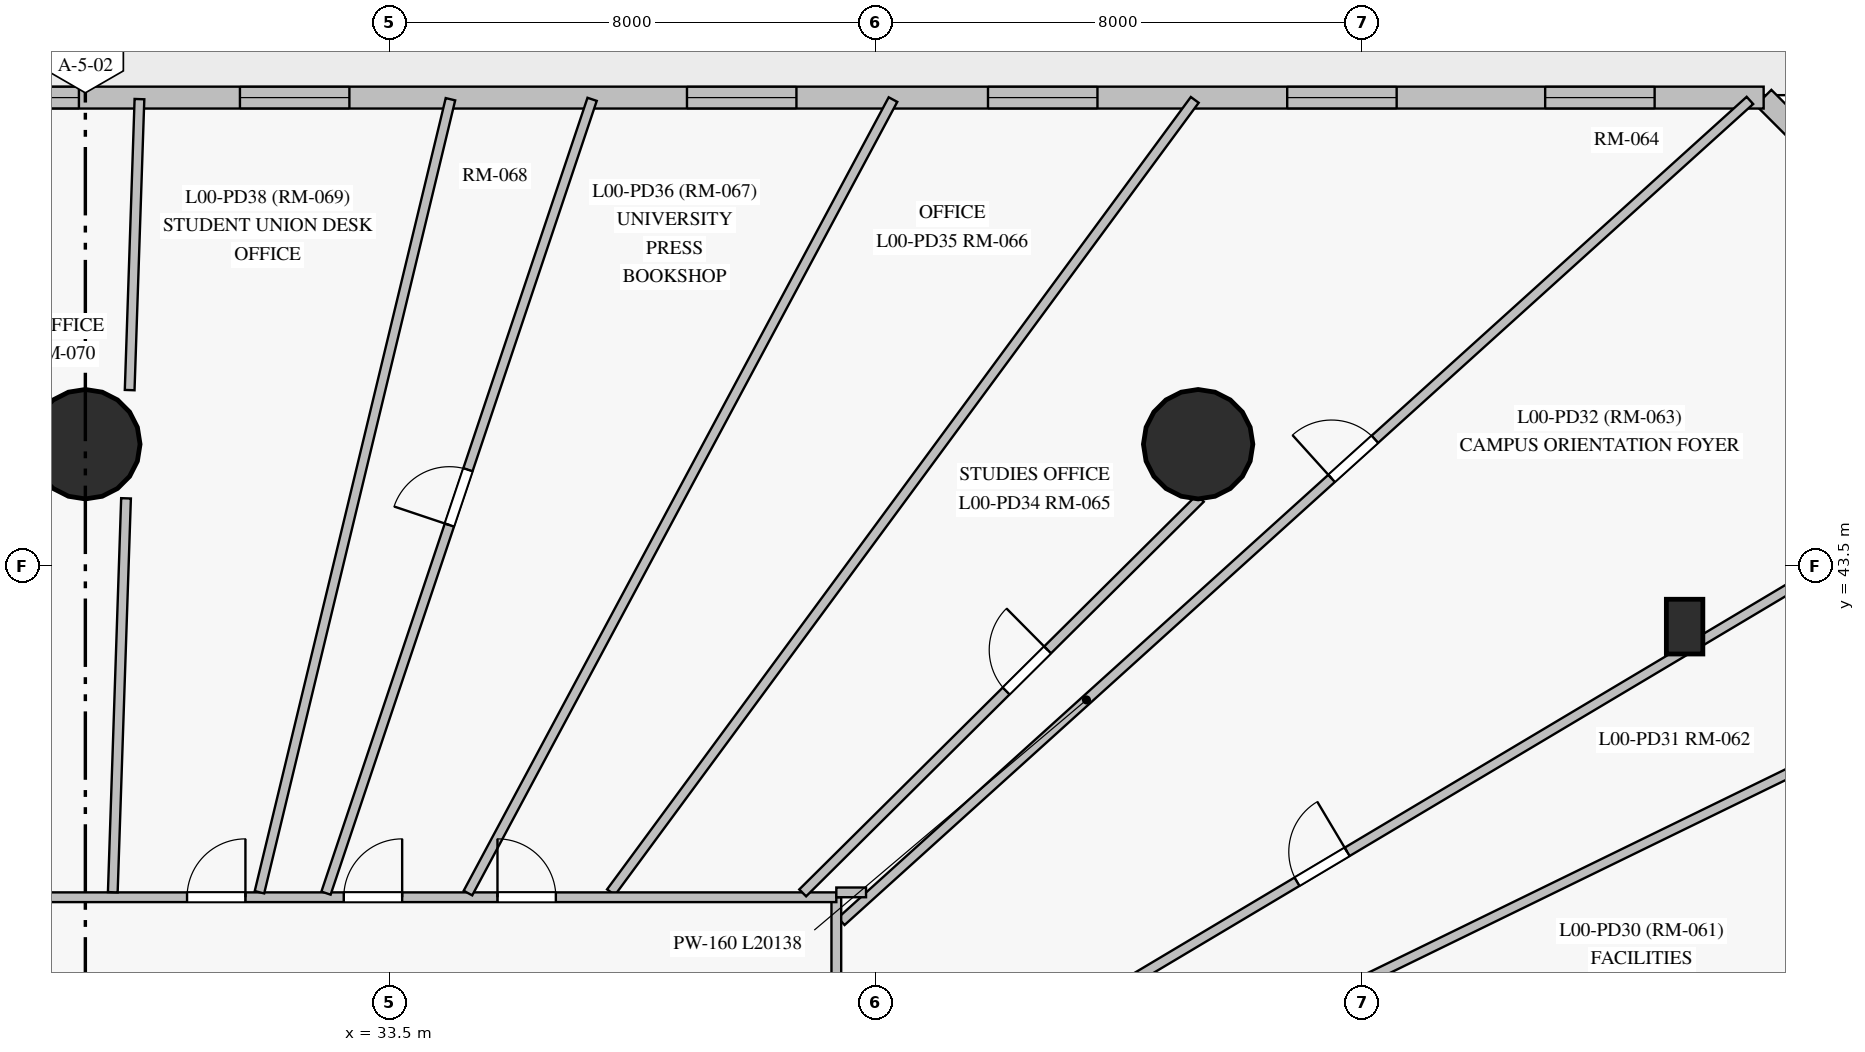
"""IFC4 building model, lengths in metres.
Left out: names, types, materials, properties, quantities, classifications, styles, units other than length and angle.
Written with IfcOpenShell. Run it as: python <this file> out.ifc"""

import sys

from ifc_helpers import new_model, si_unit, direction, frame, frame_2d, origin, origin_with_axes, origin_2d, place, context, subcontext, project, spatial, rectangle, circle, extrude, source, transform, mapped, element, fill, save


model = new_model("IFC4")
c1 = context("Model", 3, precision=1e-05, world=origin(), true_north=direction((0.0, 1.0)))
c2 = subcontext(c1, "Body", "Model", "MODEL_VIEW")
j1 = project(units=[si_unit("LENGTHUNIT", "METRE"), si_unit("PLANEANGLEUNIT", "RADIAN")], contexts=[c1])
p1 = place(None, origin())
s1 = spatial("IfcSite", under=j1, at=p1, CompositionType="ELEMENT")
p2 = place(p1, origin())
s2 = spatial("IfcBuilding", under=s1, at=p2, CompositionType="ELEMENT")
p3 = place(p2, origin())
s3 = spatial("IfcBuildingStorey", under=s2, at=p3, CompositionType="ELEMENT", Elevation=0.0)
m1 = source(origin_with_axes(), c2, "Body", "SweptSolid", [
    extrude(circle(Radius=0.9, at=origin_2d()), origin(), (0.0, 0.0, 1.0), 4.5),
])
for number, where, z_axis, x_axis in (
    (1, (28.5, 45.5, 0.0), (0.0, 0.0, 1.0), (1.0, 0.0, 0.0)),
    (2, (46.8, 45.5, 0.0), (0.0, 0.0, 1.0), (1.0, 0.0, 0.0)),
):
    element("IfcColumn", number, at=place(p3, frame(where, z_axis=z_axis, x_axis=x_axis)), inside=s3, PredefinedType="COLUMN", context=c2, shape_type="MappedRepresentation", body=[
        mapped(m1, transform((0.0, 0.0, 0.0), scale=1.0)),
    ])
m2 = source(origin_with_axes(), c2, "Body", "SweptSolid", [
    extrude(rectangle(XDim=0.6, YDim=0.9, at=origin_2d()), origin(), (0.0, 0.0, 1.0), 4.5),
])
p4 = place(p3, frame((54.8, 42.5, 0.0), z_axis=(0.0, 0.0, 1.0), x_axis=(1.0, 0.0, 0.0)))
e3 = element("IfcColumn", 3, at=p4, inside=s3, PredefinedType="PILASTER", context=c2, shape_type="MappedRepresentation", body=[
    mapped(m2, transform((0.0, 0.0, 0.0), scale=1.0)),
])
p5 = place(p3, frame((56.8, 50.5, 0.0), z_axis=(0.0, 0.0, 1.0), x_axis=(-0.707106781187, 0.707106781187, 0.0)))
e4 = element("IfcWall", 4, at=p5, inside=s3, PredefinedType="SOLIDWALL", context=c2, shape_type="SweptSolid", body=[
    extrude(rectangle(XDim=0.99, YDim=0.36, at=frame_2d((0.495, 0.0))), origin(), (0.0, 0.0, 1.0), 4.2),
])
p6 = place(p3, frame((1.5, 51.2, 0.0), z_axis=(0.0, 0.0, 1.0), x_axis=(1.0, 0.0, 0.0)))
e5 = element("IfcWall", 5, at=p6, inside=s3, PredefinedType="SOLIDWALL", context=c2, shape_type="SweptSolid", body=[
    extrude(rectangle(XDim=54.6, YDim=0.36, at=frame_2d((27.3, 0.0))), origin(), (0.0, 0.0, 1.0), 4.2),
])
p7 = place(p6, frame((51.007, 0.0, 0.85)))
e6 = element("IfcOpeningElement", 6, at=p7, cuts=e5, PredefinedType="OPENING", context=c2, shape_type="SweptSolid", body=[
    extrude(rectangle(XDim=1.8, YDim=2.2, at=frame_2d((0.9, 1.1))), frame((0.0, 0.19, 0.0), z_axis=(0.0, -1.0, 0.0), x_axis=(1.0, 0.0, 0.0)), (0.0, 0.0, 1.0), 0.38),
])
p8 = place(p6, frame((46.765, 0.0, 0.85)))
e7 = element("IfcOpeningElement", 7, at=p8, cuts=e5, PredefinedType="OPENING", context=c2, shape_type="SweptSolid", body=[
    extrude(rectangle(XDim=1.8, YDim=2.2, at=frame_2d((0.9, 1.1))), frame((0.0, 0.19, 0.0), z_axis=(0.0, -1.0, 0.0), x_axis=(1.0, 0.0, 0.0)), (0.0, 0.0, 1.0), 0.38),
])
p9 = place(p6, frame((41.844, 0.0, 0.85)))
e8 = element("IfcOpeningElement", 8, at=p9, cuts=e5, PredefinedType="OPENING", context=c2, shape_type="SweptSolid", body=[
    extrude(rectangle(XDim=1.8, YDim=2.2, at=frame_2d((0.9, 1.1))), frame((0.0, 0.19, 0.0), z_axis=(0.0, -1.0, 0.0), x_axis=(1.0, 0.0, 0.0)), (0.0, 0.0, 1.0), 0.38),
])
p10 = place(p6, frame((36.894, 0.0, 0.85)))
e9 = element("IfcOpeningElement", 9, at=p10, cuts=e5, PredefinedType="OPENING", context=c2, shape_type="SweptSolid", body=[
    extrude(rectangle(XDim=1.8, YDim=2.2, at=frame_2d((0.9, 1.1))), frame((0.0, 0.19, 0.0), z_axis=(0.0, -1.0, 0.0), x_axis=(1.0, 0.0, 0.0)), (0.0, 0.0, 1.0), 0.38),
])
p11 = place(p6, frame((29.542, 0.0, 0.85)))
e10 = element("IfcOpeningElement", 10, at=p11, cuts=e5, PredefinedType="OPENING", context=c2, shape_type="SweptSolid", body=[
    extrude(rectangle(XDim=1.8, YDim=2.2, at=frame_2d((0.9, 1.1))), frame((0.0, 0.19, 0.0), z_axis=(0.0, -1.0, 0.0), x_axis=(1.0, 0.0, 0.0)), (0.0, 0.0, 1.0), 0.38),
])
p12 = place(p6, frame((25.094, 0.0, 0.85)))
e11 = element("IfcOpeningElement", 11, at=p12, cuts=e5, PredefinedType="OPENING", context=c2, shape_type="SweptSolid", body=[
    extrude(rectangle(XDim=1.8, YDim=2.2, at=frame_2d((0.9, 1.1))), frame((0.0, 0.19, 0.0), z_axis=(0.0, -1.0, 0.0), x_axis=(1.0, 0.0, 0.0)), (0.0, 0.0, 1.0), 0.38),
])
p13 = place(p6, frame((11.445, 0.0, 0.85)))
e12 = element("IfcOpeningElement", 12, at=p13, cuts=e5, PredefinedType="OPENING", context=c2, shape_type="SweptSolid", body=[
    extrude(rectangle(XDim=1.8, YDim=2.2, at=frame_2d((0.9, 1.1))), frame((0.0, 0.19, 0.0), z_axis=(0.0, -1.0, 0.0), x_axis=(1.0, 0.0, 0.0)), (0.0, 0.0, 1.0), 0.38),
])
p14 = place(p6, frame((2.908, 0.0, 0.85)))
e13 = element("IfcOpeningElement", 13, at=p14, cuts=e5, PredefinedType="OPENING", context=c2, shape_type="SweptSolid", body=[
    extrude(rectangle(XDim=1.8, YDim=2.2, at=frame_2d((0.9, 1.1))), frame((0.0, 0.19, 0.0), z_axis=(0.0, -1.0, 0.0), x_axis=(1.0, 0.0, 0.0)), (0.0, 0.0, 1.0), 0.38),
])
p15 = place(p6, frame((19.6, 0.0, 0.0)))
e14 = element("IfcOpeningElement", 14, at=p15, cuts=e5, PredefinedType="OPENING", context=c2, shape_type="SweptSolid", body=[
    extrude(rectangle(XDim=1.8, YDim=2.3, at=frame_2d((0.9, 1.15))), frame((0.0, 0.19, 0.0), z_axis=(0.0, -1.0, 0.0), x_axis=(1.0, 0.0, 0.0)), (0.0, 0.0, 1.0), 0.38),
])
p16 = place(p6, frame((22.2, 0.0, 0.0)))
e15 = element("IfcOpeningElement", 15, at=p16, cuts=e5, PredefinedType="OPENING", context=c2, shape_type="SweptSolid", body=[
    extrude(rectangle(XDim=1.8, YDim=2.3, at=frame_2d((0.9, 1.15))), frame((0.0, 0.19, 0.0), z_axis=(0.0, -1.0, 0.0), x_axis=(1.0, 0.0, 0.0)), (0.0, 0.0, 1.0), 0.38),
])
p17 = place(p6, frame((15.5, 0.0, 0.0)))
e16 = element("IfcOpeningElement", 16, at=p17, cuts=e5, PredefinedType="OPENING", context=c2, shape_type="SweptSolid", body=[
    extrude(rectangle(XDim=1.8, YDim=2.3, at=frame_2d((0.9, 1.15))), frame((0.0, 0.19, 0.0), z_axis=(0.0, -1.0, 0.0), x_axis=(1.0, 0.0, 0.0)), (0.0, 0.0, 1.0), 0.38),
])
p18 = place(p3, frame((40.932, 37.652, 0.0), z_axis=(0.0, 0.0, 1.0), x_axis=(0.741982219561, 0.670419559571, 0.0)))
e17 = element("IfcWall", 17, at=p18, inside=s3, PredefinedType="PARTITIONING", context=c2, shape_type="SweptSolid", body=[
    extrude(rectangle(XDim=20.138, YDim=0.16, at=frame_2d((10.069, 0.0))), origin(), (0.0, 0.0, 1.0), 4.2),
])
p19 = place(p18, frame((10.867, 0.0, 0.0)))
e18 = element("IfcOpeningElement", 18, at=p19, cuts=e17, PredefinedType="OPENING", context=c2, shape_type="SweptSolid", body=[
    extrude(rectangle(XDim=0.96, YDim=2.15, at=frame_2d((0.48, 1.075))), frame((0.0, 0.09, 0.0), z_axis=(0.0, -1.0, 0.0), x_axis=(1.0, 0.0, 0.0)), (0.0, 0.0, 1.0), 0.18),
])
p20 = place(p3, frame((40.932, 33.839, 0.0), z_axis=(0.0, 0.0, 1.0), x_axis=(0.859023594577, 0.51193599596, 0.0)))
e19 = element("IfcWall", 19, at=p20, inside=s3, PredefinedType="PARTITIONING", context=c2, shape_type="SweptSolid", body=[
    extrude(rectangle(XDim=18.433, YDim=0.16, at=frame_2d((9.216, 0.0))), origin(), (0.0, 0.0, 1.0), 4.2),
])
p21 = place(p20, frame((8.724, 0.0, 0.0)))
e20 = element("IfcOpeningElement", 20, at=p21, cuts=e19, PredefinedType="OPENING", context=c2, shape_type="SweptSolid", body=[
    extrude(rectangle(XDim=0.96, YDim=2.15, at=frame_2d((0.48, 1.075))), frame((0.0, 0.09, 0.0), z_axis=(0.0, -1.0, 0.0), x_axis=(1.0, 0.0, 0.0)), (0.0, 0.0, 1.0), 0.18),
])
p22 = place(p3, frame((40.85, 38.05, 0.0), z_axis=(0.0, 0.0, 1.0), x_axis=(0.0, -1.0, 0.0)))
e21 = element("IfcWall", 21, at=p22, inside=s3, PredefinedType="PARTITIONING", context=c2, shape_type="SweptSolid", body=[
    extrude(rectangle(XDim=18.508, YDim=0.16, at=frame_2d((9.254, 0.0))), origin(), (0.0, 0.0, 1.0), 3.25),
])
p23 = place(p22, frame((12.99, 0.0, 0.0)))
e22 = element("IfcOpeningElement", 22, at=p23, cuts=e21, PredefinedType="OPENING", context=c2, shape_type="SweptSolid", body=[
    extrude(rectangle(XDim=0.96, YDim=2.15, at=frame_2d((0.48, 1.075))), frame((0.0, 0.09, 0.0), z_axis=(0.0, -1.0, 0.0), x_axis=(1.0, 0.0, 0.0)), (0.0, 0.0, 1.0), 0.18),
])
p24 = place(p22, frame((11.446, 0.0, 0.0)))
e23 = element("IfcOpeningElement", 23, at=p24, cuts=e21, PredefinedType="OPENING", context=c2, shape_type="SweptSolid", body=[
    extrude(rectangle(XDim=0.96, YDim=2.15, at=frame_2d((0.48, 1.075))), frame((0.0, 0.09, 0.0), z_axis=(0.0, -1.0, 0.0), x_axis=(1.0, 0.0, 0.0)), (0.0, 0.0, 1.0), 0.18),
])
p25 = place(p22, frame((8.695, 0.0, 0.0)))
e24 = element("IfcOpeningElement", 24, at=p25, cuts=e21, PredefinedType="OPENING", context=c2, shape_type="SweptSolid", body=[
    extrude(rectangle(XDim=0.96, YDim=2.15, at=frame_2d((0.48, 1.075))), frame((0.0, 0.09, 0.0), z_axis=(0.0, -1.0, 0.0), x_axis=(1.0, 0.0, 0.0)), (0.0, 0.0, 1.0), 0.18),
])
p26 = place(p22, frame((5.944, 0.0, 0.0)))
e25 = element("IfcOpeningElement", 25, at=p26, cuts=e21, PredefinedType="OPENING", context=c2, shape_type="SweptSolid", body=[
    extrude(rectangle(XDim=0.96, YDim=2.15, at=frame_2d((0.48, 1.075))), frame((0.0, 0.09, 0.0), z_axis=(0.0, -1.0, 0.0), x_axis=(1.0, 0.0, 0.0)), (0.0, 0.0, 1.0), 0.18),
])
p27 = place(p22, frame((2.72, 0.0, 0.0)))
e26 = element("IfcOpeningElement", 26, at=p27, cuts=e21, PredefinedType="OPENING", context=c2, shape_type="SweptSolid", body=[
    extrude(rectangle(XDim=0.96, YDim=2.15, at=frame_2d((0.48, 1.075))), frame((0.0, 0.09, 0.0), z_axis=(0.0, -1.0, 0.0), x_axis=(1.0, 0.0, 0.0)), (0.0, 0.0, 1.0), 0.18),
])
p28 = place(p3, frame((40.932, 32.495, 0.0), z_axis=(0.0, 0.0, 1.0), x_axis=(0.898852728793, 0.438250809403, 0.0)))
e27 = element("IfcWall", 27, at=p28, inside=s3, PredefinedType="PARTITIONING", context=c2, shape_type="SweptSolid", body=[
    extrude(rectangle(XDim=17.619, YDim=0.16, at=frame_2d((8.809, 0.0))), origin(), (0.0, 0.0, 1.0), 4.2),
])
p29 = place(p3, frame((37.144, 38.132, 0.0), z_axis=(0.0, 0.0, 1.0), x_axis=(0.593152727381, 0.805089958949, 0.0)))
e28 = element("IfcWall", 28, at=p29, inside=s3, PredefinedType="PARTITIONING", context=c2, shape_type="SweptSolid", body=[
    extrude(rectangle(XDim=16.185, YDim=0.16, at=frame_2d((8.092, 0.0))), origin(), (0.0, 0.0, 1.0), 4.2),
])
p30 = place(p3, frame((25.6, 38.05, 0.0), z_axis=(0.0, 0.0, 1.0), x_axis=(1.0, 0.0, 0.0)))
e29 = element("IfcWall", 29, at=p30, inside=s3, PredefinedType="PARTITIONING", context=c2, shape_type="SweptSolid", body=[
    extrude(rectangle(XDim=15.25, YDim=0.16, at=frame_2d((7.625, 0.0))), origin(), (0.0, 0.0, 1.0), 4.2),
])
p31 = place(p30, frame((9.677, 0.0, 0.0)))
e30 = element("IfcOpeningElement", 30, at=p31, cuts=e29, PredefinedType="OPENING", context=c2, shape_type="SweptSolid", body=[
    extrude(rectangle(XDim=0.96, YDim=2.15, at=frame_2d((0.48, 1.075))), frame((0.0, 0.09, 0.0), z_axis=(0.0, -1.0, 0.0), x_axis=(1.0, 0.0, 0.0)), (0.0, 0.0, 1.0), 0.18),
])
p32 = place(p30, frame((7.15, 0.0, 0.0)))
e31 = element("IfcOpeningElement", 31, at=p32, cuts=e29, PredefinedType="OPENING", context=c2, shape_type="SweptSolid", body=[
    extrude(rectangle(XDim=0.96, YDim=2.15, at=frame_2d((0.48, 1.075))), frame((0.0, 0.09, 0.0), z_axis=(0.0, -1.0, 0.0), x_axis=(1.0, 0.0, 0.0)), (0.0, 0.0, 1.0), 0.18),
])
p33 = place(p30, frame((4.573, 0.0, 0.0)))
e32 = element("IfcOpeningElement", 32, at=p33, cuts=e29, PredefinedType="OPENING", context=c2, shape_type="SweptSolid", body=[
    extrude(rectangle(XDim=0.96, YDim=2.15, at=frame_2d((0.48, 1.075))), frame((0.0, 0.09, 0.0), z_axis=(0.0, -1.0, 0.0), x_axis=(1.0, 0.0, 0.0)), (0.0, 0.0, 1.0), 0.18),
])
p34 = place(p3, frame((34.792, 38.119, 0.0), z_axis=(0.0, 0.0, 1.0), x_axis=(0.472198527924, 0.881492229249, 0.0)))
e33 = element("IfcWall", 33, at=p34, inside=s3, PredefinedType="PARTITIONING", context=c2, shape_type="SweptSolid", body=[
    extrude(rectangle(XDim=14.802, YDim=0.16, at=frame_2d((7.401, 0.0))), origin(), (0.0, 0.0, 1.0), 4.2),
])
p35 = place(p3, frame((32.458, 38.118, 0.0), z_axis=(0.0, 0.0, 1.0), x_axis=(0.317860488547, 0.948137495209, 0.0)))
e34 = element("IfcWall", 34, at=p35, inside=s3, PredefinedType="PARTITIONING", context=c2, shape_type="SweptSolid", body=[
    extrude(rectangle(XDim=13.768, YDim=0.16, at=frame_2d((6.884, 0.0))), origin(), (0.0, 0.0, 1.0), 4.2),
])
p36 = place(p35, frame((6.384, 0.0, 0.0)))
e35 = element("IfcOpeningElement", 35, at=p36, cuts=e34, PredefinedType="OPENING", context=c2, shape_type="SweptSolid", body=[
    extrude(rectangle(XDim=0.96, YDim=2.15, at=frame_2d((0.48, 1.075))), frame((0.0, 0.09, 0.0), z_axis=(0.0, -1.0, 0.0), x_axis=(1.0, 0.0, 0.0)), (0.0, 0.0, 1.0), 0.18),
])
p37 = place(p3, frame((31.363, 38.132, 0.0), z_axis=(0.0, 0.0, 1.0), x_axis=(0.234150049596, 0.972200470209, 0.0)))
e36 = element("IfcWall", 36, at=p37, inside=s3, PredefinedType="PARTITIONING", context=c2, shape_type="SweptSolid", body=[
    extrude(rectangle(XDim=13.414, YDim=0.16, at=frame_2d((6.707, 0.0))), origin(), (0.0, 0.0, 1.0), 4.2),
])
p38 = place(p3, frame((40.297, 38.121, 0.0), z_axis=(0.0, 0.0, 1.0), x_axis=(0.709818075558, 0.704385050673, 0.0)))
e37 = element("IfcWall", 37, at=p38, inside=s3, PredefinedType="PARTITIONING", context=c2, shape_type="SweptSolid", body=[
    extrude(rectangle(XDim=9.212, YDim=0.16, at=frame_2d((4.606, 0.0))), origin(), (0.0, 0.0, 1.0), 3.25),
])
p39 = place(p38, frame((4.713, 0.0, 0.0)))
e38 = element("IfcOpeningElement", 38, at=p39, cuts=e37, PredefinedType="OPENING", context=c2, shape_type="SweptSolid", body=[
    extrude(rectangle(XDim=0.96, YDim=2.15, at=frame_2d((0.48, 1.075))), frame((0.0, 0.09, 0.0), z_axis=(0.0, -1.0, 0.0), x_axis=(1.0, 0.0, 0.0)), (0.0, 0.0, 1.0), 0.18),
])
p40 = place(p3, frame((28.951, 38.132, 0.0), z_axis=(0.0, 0.0, 1.0), x_axis=(0.033598266136, 0.99943541888, 0.0)))
e39 = element("IfcWall", 39, at=p40, inside=s3, PredefinedType="PARTITIONING", context=c2, shape_type="SweptSolid", body=[
    extrude(rectangle(XDim=6.482, YDim=0.16, at=frame_2d((3.241, 0.0))), origin(), (0.0, 0.0, 1.0), 4.2),
])
p41 = place(p3, frame((29.229, 46.39, 0.0), z_axis=(0.0, 0.0, 1.0), x_axis=(0.033603460508, 0.999435244246, 0.0)))
e40 = element("IfcWall", 40, at=p41, inside=s3, PredefinedType="PARTITIONING", context=c2, shape_type="SweptSolid", body=[
    extrude(rectangle(XDim=4.788, YDim=0.16, at=frame_2d((2.394, 0.0))), origin(), (0.0, 0.0, 1.0), 4.2),
])
p42 = place(p3, frame((41.338, 38.13, 0.0), z_axis=(0.0, 0.0, 1.0), x_axis=(-1.0, 0.0, 0.0)))
e41 = element("IfcWall", 41, at=p42, inside=s3, PredefinedType="PARTITIONING", context=c2, shape_type="SweptSolid", body=[
    extrude(rectangle(XDim=0.488, YDim=0.16, at=frame_2d((0.244, 0.0))), origin(), (0.0, 0.0, 1.0), 4.2),
])
m3 = source(origin_with_axes(), c2, "Body", "SweptSolid", [
    extrude(rectangle(XDim=1.8, YDim=2.2, at=frame_2d((0.9, 1.1))), frame((0.0, 0.03, 0.0), z_axis=(0.0, -1.0, 0.0), x_axis=(1.0, 0.0, 0.0)), (0.0, 0.0, 1.0), 0.06),
])
p43 = place(p7, origin())
e42 = element("IfcWindow", 42, at=p43, inside=s3, PartitioningType="SINGLE_PANEL", PredefinedType="WINDOW", context=c2, shape_type="MappedRepresentation", body=[
    mapped(m3, transform((0.0, 0.0, 0.0), scale=1.0)),
])
fill(e6, e42)
p44 = place(p8, origin())
e43 = element("IfcWindow", 43, at=p44, inside=s3, PartitioningType="SINGLE_PANEL", PredefinedType="WINDOW", context=c2, shape_type="MappedRepresentation", body=[
    mapped(m3, transform((0.0, 0.0, 0.0), scale=1.0)),
])
fill(e7, e43)
p45 = place(p9, origin())
e44 = element("IfcWindow", 44, at=p45, inside=s3, PartitioningType="SINGLE_PANEL", PredefinedType="WINDOW", context=c2, shape_type="MappedRepresentation", body=[
    mapped(m3, transform((0.0, 0.0, 0.0), scale=1.0)),
])
fill(e8, e44)
p46 = place(p10, origin())
e45 = element("IfcWindow", 45, at=p46, inside=s3, PartitioningType="SINGLE_PANEL", PredefinedType="WINDOW", context=c2, shape_type="MappedRepresentation", body=[
    mapped(m3, transform((0.0, 0.0, 0.0), scale=1.0)),
])
fill(e9, e45)
p47 = place(p11, origin())
e46 = element("IfcWindow", 46, at=p47, inside=s3, PartitioningType="SINGLE_PANEL", PredefinedType="WINDOW", context=c2, shape_type="MappedRepresentation", body=[
    mapped(m3, transform((0.0, 0.0, 0.0), scale=1.0)),
])
fill(e10, e46)
p48 = place(p12, origin())
e47 = element("IfcWindow", 47, at=p48, inside=s3, PartitioningType="SINGLE_PANEL", PredefinedType="WINDOW", context=c2, shape_type="MappedRepresentation", body=[
    mapped(m3, transform((0.0, 0.0, 0.0), scale=1.0)),
])
fill(e11, e47)
m4 = source(origin_with_axes(), c2, "Body", "SweptSolid", [
    extrude(rectangle(XDim=0.96, YDim=2.15, at=frame_2d((0.48, 1.075))), frame((0.0, 0.025, 0.0), z_axis=(0.0, -1.0, 0.0), x_axis=(1.0, 0.0, 0.0)), (0.0, 0.0, 1.0), 0.05),
])
p49 = place(p21, origin())
e48 = element("IfcDoor", 48, at=p49, inside=s3, OperationType="SINGLE_SWING_RIGHT", PredefinedType="DOOR", context=c2, shape_type="MappedRepresentation", body=[
    mapped(m4, transform((0.0, 0.0, 0.0), scale=1.0)),
])
fill(e20, e48)
p50 = place(p19, origin())
e49 = element("IfcDoor", 49, at=p50, inside=s3, OperationType="SINGLE_SWING_LEFT", PredefinedType="DOOR", context=c2, shape_type="MappedRepresentation", body=[
    mapped(m4, transform((0.0, 0.0, 0.0), scale=1.0)),
])
fill(e18, e49)
p51 = place(p39, origin())
e50 = element("IfcDoor", 50, at=p51, inside=s3, OperationType="SINGLE_SWING_RIGHT", PredefinedType="DOOR", context=c2, shape_type="MappedRepresentation", body=[
    mapped(m4, transform((0.0, 0.0, 0.0), scale=1.0)),
])
fill(e38, e50)
p52 = place(p31, origin())
e51 = element("IfcDoor", 51, at=p52, inside=s3, OperationType="SINGLE_SWING_LEFT", PredefinedType="DOOR", context=c2, shape_type="MappedRepresentation", body=[
    mapped(m4, transform((0.0, 0.0, 0.0), scale=1.0)),
])
fill(e30, e51)
p53 = place(p32, origin())
e52 = element("IfcDoor", 52, at=p53, inside=s3, OperationType="SINGLE_SWING_RIGHT", PredefinedType="DOOR", context=c2, shape_type="MappedRepresentation", body=[
    mapped(m4, transform((0.0, 0.0, 0.0), scale=1.0)),
])
fill(e31, e52)
p54 = place(p36, origin())
e53 = element("IfcDoor", 53, at=p54, inside=s3, OperationType="SINGLE_SWING_LEFT", PredefinedType="DOOR", context=c2, shape_type="MappedRepresentation", body=[
    mapped(m4, transform((0.0, 0.0, 0.0), scale=1.0)),
])
fill(e35, e53)
p55 = place(p33, origin())
e54 = element("IfcDoor", 54, at=p55, inside=s3, OperationType="SINGLE_SWING_RIGHT", PredefinedType="DOOR", context=c2, shape_type="MappedRepresentation", body=[
    mapped(m4, transform((0.0, 0.0, 0.0), scale=1.0)),
])
fill(e32, e54)
save(model, sys.argv[1])
